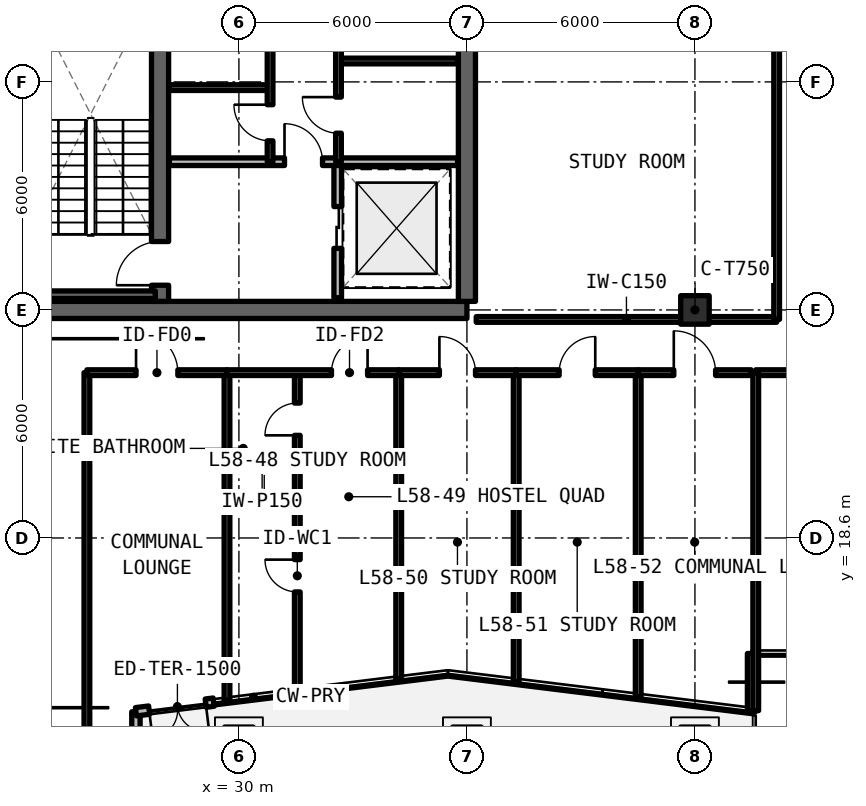
"""IFC4 building model, lengths in metres.
Left out: names, types, materials, properties, quantities, classifications, styles, units other than length and angle.
Written with IfcOpenShell. Run it as: python <this file> out.ifc"""

import sys

from ifc_helpers import new_model, si_unit, direction, frame, frame_2d, origin, origin_2d, place, context, subcontext, project, spatial, rectangle, extrude, element, fill, save


model = new_model("IFC4")
c1 = context("Model", 3, precision=1e-05, world=origin(), true_north=direction((0.0, 1.0)))
c2 = subcontext(c1, "Body", "Model", "MODEL_VIEW")
j1 = project(units=[si_unit("LENGTHUNIT", "METRE"), si_unit("PLANEANGLEUNIT", "RADIAN")], contexts=[c1])
p1 = place(None, origin())
s1 = spatial("IfcSite", under=j1, at=p1, CompositionType="ELEMENT")
p2 = place(p1, origin())
s2 = spatial("IfcBuilding", under=s1, at=p2, CompositionType="ELEMENT")
p3 = place(p2, frame((0.0, 0.0, 208.23)))
s3 = spatial("IfcBuildingStorey", under=s2, at=p3, CompositionType="ELEMENT", Elevation=208.23)
p4 = place(p3, frame((24.0, 24.6, 0.0), z_axis=(0.0, 0.0, 1.0), x_axis=(1.0, 0.0, 0.0)))
e1 = element("IfcWall", 1, at=p4, inside=s3, PredefinedType="SHEAR", context=c2, shape_type="SweptSolid", body=[
    extrude(rectangle(XDim=12.0, YDim=0.45, at=frame_2d((6.0, 0.0))), origin(), (0.0, 0.0, 1.0), 3.63),
])
p5 = place(p3, frame((36.0, 24.825, 0.0), z_axis=(0.0, 0.0, 1.0), x_axis=(0.0, 1.0, 0.0)))
e2 = element("IfcWall", 2, at=p5, inside=s3, PredefinedType="SHEAR", context=c2, shape_type="SweptSolid", body=[
    extrude(rectangle(XDim=8.975, YDim=0.45, at=frame_2d((4.488, 0.0))), origin(), (0.0, 0.0, 1.0), 3.63),
])
p6 = place(p3, frame((27.925, 24.825, 0.0), z_axis=(0.0, 0.0, 1.0), x_axis=(0.0, 1.0, 0.0)))
e3 = element("IfcWall", 3, at=p6, inside=s3, PredefinedType="SHEAR", context=c2, shape_type="SweptSolid", body=[
    extrude(rectangle(XDim=17.55, YDim=0.45, at=frame_2d((8.775, 0.0))), origin(), (0.0, 0.0, 1.0), 3.63),
])
p7 = place(p6, frame((0.425, 0.0, 0.0)))
e4 = element("IfcOpeningElement", 4, at=p7, cuts=e3, PredefinedType="OPENING", context=c2, shape_type="SweptSolid", body=[
    extrude(rectangle(XDim=1.15, YDim=2.15, at=frame_2d((0.575, 1.075))), frame((0.0, 0.235, 0.0), z_axis=(0.0, -1.0, 0.0), x_axis=(1.0, 0.0, 0.0)), (0.0, 0.0, 1.0), 0.47),
])
p8 = place(p6, frame((9.625, 0.0, 0.0)))
e5 = element("IfcOpeningElement", 5, at=p8, cuts=e3, PredefinedType="OPENING", context=c2, shape_type="SweptSolid", body=[
    extrude(rectangle(XDim=1.15, YDim=2.15, at=frame_2d((0.575, 1.075))), frame((0.0, 0.235, 0.0), z_axis=(0.0, -1.0, 0.0), x_axis=(1.0, 0.0, 0.0)), (0.0, 0.0, 1.0), 0.47),
])
p9 = place(p3, frame((42.0, 24.6, 0.0), z_axis=(0.0, 0.0, 1.0), x_axis=(1.0, 0.0, 0.0)))
e6 = element("IfcColumn", 6, at=p9, inside=s3, PredefinedType="COLUMN", context=c2, shape_type="SweptSolid", body=[
    extrude(rectangle(XDim=0.75, YDim=0.75, at=origin_2d()), origin(), (0.0, 0.0, 1.0), 3.63),
])
p10 = place(p3, frame((27.29, 12.16, 0.0), z_axis=(0.0, 0.0, 1.0), x_axis=(0.0, 1.0, 0.0)))
e7 = element("IfcWall", 7, at=p10, inside=s3, PredefinedType="SOLIDWALL", context=c2, shape_type="SweptSolid", body=[
    extrude(rectangle(XDim=1.867, YDim=0.22, at=frame_2d((0.934, 0.0))), origin(), (0.0, 0.0, 1.0), 3.41),
])
p11 = place(p3, frame((27.29, 14.027, 0.0), z_axis=(0.0, 0.0, 1.0), x_axis=(0.992462742039, 0.122546748898, 0.0)))
e8 = element("IfcWall", 8, at=p11, inside=s3, PredefinedType="SOLIDWALL", context=c2, shape_type="SweptSolid", body=[
    extrude(rectangle(XDim=2.06, YDim=0.22, at=frame_2d((1.03, 0.0))), origin(), (0.0, 0.0, 1.0), 3.41),
])
p12 = place(p11, frame((0.35, 0.0, 0.0)))
e9 = element("IfcOpeningElement", 9, at=p12, cuts=e8, PredefinedType="OPENING", context=c2, shape_type="SweptSolid", body=[
    extrude(rectangle(XDim=1.5, YDim=2.2, at=frame_2d((0.75, 1.1))), frame((0.0, 0.12, 0.0), z_axis=(0.0, -1.0, 0.0), x_axis=(1.0, 0.0, 0.0)), (0.0, 0.0, 1.0), 0.24),
])
p13 = place(p3, frame((43.49, 14.054, 0.0), z_axis=(0.0, 0.0, 1.0), x_axis=(0.0, 1.0, 0.0)))
e10 = element("IfcWall", 10, at=p13, inside=s3, PredefinedType="SOLIDWALL", context=c2, shape_type="SweptSolid", body=[
    extrude(rectangle(XDim=1.506, YDim=0.22, at=frame_2d((0.753, 0.0))), origin(), (0.0, 0.0, 1.0), 3.41),
])
p14 = place(p3, frame((21.71, 16.296, 0.0), z_axis=(0.0, 0.0, 1.0), x_axis=(0.707106781187, -0.707106781187, 0.0)))
e11 = element("IfcWall", 11, at=p14, inside=s3, PredefinedType="SOLIDWALL", context=c2, shape_type="SweptSolid", body=[
    extrude(rectangle(XDim=5.849, YDim=0.22, at=frame_2d((2.924, 0.0))), origin(), (0.0, 0.0, 1.0), 3.41),
])
p15 = place(p14, frame((1.224, 0.0, 0.78)))
e12 = element("IfcOpeningElement", 12, at=p15, cuts=e11, PredefinedType="OPENING", context=c2, shape_type="SweptSolid", body=[
    extrude(rectangle(XDim=3.4, YDim=1.66, at=frame_2d((1.7, 0.83))), frame((0.0, 0.12, 0.0), z_axis=(0.0, -1.0, 0.0), x_axis=(1.0, 0.0, 0.0)), (0.0, 0.0, 1.0), 0.24),
])
p16 = place(p3, frame((32.6, 24.92, 0.0), z_axis=(0.0, 0.0, 1.0), x_axis=(0.0, 1.0, 0.0)))
e13 = element("IfcWall", 13, at=p16, inside=s3, PredefinedType="SOLIDWALL", context=c2, shape_type="SweptSolid", body=[
    extrude(rectangle(XDim=3.58, YDim=0.2, at=frame_2d((1.79, 0.0))), origin(), (0.0, 0.0, 1.0), 2.63),
])
p17 = place(p16, frame((1.3, 0.0, 0.0)))
e14 = element("IfcOpeningElement", 14, at=p17, cuts=e13, PredefinedType="OPENING", context=c2, shape_type="SweptSolid", body=[
    extrude(rectangle(XDim=1.1, YDim=2.2, at=frame_2d((0.55, 1.1))), frame((0.0, 0.11, 0.0), z_axis=(0.0, -1.0, 0.0), x_axis=(1.0, 0.0, 0.0)), (0.0, 0.0, 1.0), 0.22),
])
p18 = place(p3, frame((28.17, 28.5, 0.0), z_axis=(0.0, 0.0, 1.0), x_axis=(1.0, 0.0, 0.0)))
e15 = element("IfcWall", 15, at=p18, inside=s3, PredefinedType="SOLIDWALL", context=c2, shape_type="SweptSolid", body=[
    extrude(rectangle(XDim=7.585, YDim=0.2, at=frame_2d((3.792, 0.0))), origin(), (0.0, 0.0, 1.0), 2.63),
])
p19 = place(p18, frame((3.03, 0.0, 0.0)))
e16 = element("IfcOpeningElement", 16, at=p19, cuts=e15, PredefinedType="OPENING", context=c2, shape_type="SweptSolid", body=[
    extrude(rectangle(XDim=1.0, YDim=2.15, at=frame_2d((0.5, 1.075))), frame((0.0, 0.11, 0.0), z_axis=(0.0, -1.0, 0.0), x_axis=(1.0, 0.0, 0.0)), (0.0, 0.0, 1.0), 0.22),
])
p20 = place(p3, frame((28.17, 30.45, 0.0), z_axis=(0.0, 0.0, 1.0), x_axis=(1.0, 0.0, 0.0)))
e17 = element("IfcWall", 17, at=p20, inside=s3, PredefinedType="SOLIDWALL", context=c2, shape_type="SweptSolid", body=[
    extrude(rectangle(XDim=2.63, YDim=0.15, at=frame_2d((1.315, 0.0))), origin(), (0.0, 0.0, 1.0), 2.63),
])
p21 = place(p3, frame((30.82, 28.5, 0.0), z_axis=(0.0, 0.0, 1.0), x_axis=(0.0, 1.0, 0.0)))
e18 = element("IfcWall", 18, at=p21, inside=s3, PredefinedType="SOLIDWALL", context=c2, shape_type="SweptSolid", body=[
    extrude(rectangle(XDim=5.22, YDim=0.15, at=frame_2d((2.61, 0.0))), origin(), (0.0, 0.0, 1.0), 2.63),
])
p22 = place(p21, frame((0.55, 0.0, 0.0)))
e19 = element("IfcOpeningElement", 19, at=p22, cuts=e18, PredefinedType="OPENING", context=c2, shape_type="SweptSolid", body=[
    extrude(rectangle(XDim=0.95, YDim=2.15, at=frame_2d((0.475, 1.075))), frame((0.0, 0.085, 0.0), z_axis=(0.0, -1.0, 0.0), x_axis=(1.0, 0.0, 0.0)), (0.0, 0.0, 1.0), 0.17),
])
p23 = place(p21, frame((3.35, 0.0, 0.0)))
e20 = element("IfcOpeningElement", 20, at=p23, cuts=e18, PredefinedType="OPENING", context=c2, shape_type="SweptSolid", body=[
    extrude(rectangle(XDim=0.95, YDim=2.15, at=frame_2d((0.475, 1.075))), frame((0.0, 0.085, 0.0), z_axis=(0.0, -1.0, 0.0), x_axis=(1.0, 0.0, 0.0)), (0.0, 0.0, 1.0), 0.17),
])
p24 = place(p3, frame((32.68, 31.15, 0.0), z_axis=(0.0, 0.0, 1.0), x_axis=(1.0, 0.0, 0.0)))
e21 = element("IfcWall", 21, at=p24, inside=s3, PredefinedType="SOLIDWALL", context=c2, shape_type="SweptSolid", body=[
    extrude(rectangle(XDim=3.075, YDim=0.15, at=frame_2d((1.538, 0.0))), origin(), (0.0, 0.0, 1.0), 2.63),
])
p25 = place(p3, frame((32.62, 28.5, 0.0), z_axis=(0.0, 0.0, 1.0), x_axis=(0.0, 1.0, 0.0)))
e22 = element("IfcWall", 22, at=p25, inside=s3, PredefinedType="SOLIDWALL", context=c2, shape_type="SweptSolid", body=[
    extrude(rectangle(XDim=5.22, YDim=0.15, at=frame_2d((2.61, 0.0))), origin(), (0.0, 0.0, 1.0), 2.63),
])
p26 = place(p25, frame((0.75, 0.0, 0.0)))
e23 = element("IfcOpeningElement", 23, at=p26, cuts=e22, PredefinedType="OPENING", context=c2, shape_type="SweptSolid", body=[
    extrude(rectangle(XDim=0.95, YDim=2.15, at=frame_2d((0.475, 1.075))), frame((0.0, 0.085, 0.0), z_axis=(0.0, -1.0, 0.0), x_axis=(1.0, 0.0, 0.0)), (0.0, 0.0, 1.0), 0.17),
])
p27 = place(p25, frame((3.35, 0.0, 0.0)))
e24 = element("IfcOpeningElement", 24, at=p27, cuts=e22, PredefinedType="OPENING", context=c2, shape_type="SweptSolid", body=[
    extrude(rectangle(XDim=0.95, YDim=2.15, at=frame_2d((0.475, 1.075))), frame((0.0, 0.085, 0.0), z_axis=(0.0, -1.0, 0.0), x_axis=(1.0, 0.0, 0.0)), (0.0, 0.0, 1.0), 0.17),
])
p28 = place(p3, frame((36.245, 24.35, 0.0), z_axis=(0.0, 0.0, 1.0), x_axis=(1.0, 0.0, 0.0)))
e25 = element("IfcWall", 25, at=p28, inside=s3, PredefinedType="SOLIDWALL", context=c2, shape_type="SweptSolid", body=[
    extrude(rectangle(XDim=7.905, YDim=0.15, at=frame_2d((3.952, 0.0))), origin(), (0.0, 0.0, 1.0), 2.63),
])
p29 = place(p3, frame((44.15, 24.35, 0.0), z_axis=(0.0, 0.0, 1.0), x_axis=(0.0, 1.0, 0.0)))
e26 = element("IfcWall", 26, at=p29, inside=s3, PredefinedType="SOLIDWALL", context=c2, shape_type="SweptSolid", body=[
    extrude(rectangle(XDim=9.4, YDim=0.15, at=frame_2d((4.7, 0.0))), origin(), (0.0, 0.0, 1.0), 2.63),
])
p30 = place(p3, frame((43.6, 22.95, 0.0), z_axis=(0.0, 0.0, 1.0), x_axis=(1.0, 0.0, 0.0)))
e27 = element("IfcWall", 27, at=p30, inside=s3, PredefinedType="SOLIDWALL", context=c2, shape_type="SweptSolid", body=[
    extrude(rectangle(XDim=8.4, YDim=0.15, at=frame_2d((4.2, 0.0))), origin(), (0.0, 0.0, 1.0), 2.63),
])
p31 = place(p30, frame((2.3, 0.0, 0.0)))
e28 = element("IfcOpeningElement", 28, at=p31, cuts=e27, PredefinedType="OPENING", context=c2, shape_type="SweptSolid", body=[
    extrude(rectangle(XDim=1.1, YDim=2.15, at=frame_2d((0.55, 1.075))), frame((0.0, 0.085, 0.0), z_axis=(0.0, -1.0, 0.0), x_axis=(1.0, 0.0, 0.0)), (0.0, 0.0, 1.0), 0.17),
])
p32 = place(p3, frame((43.6, 14.056, 0.0), z_axis=(0.0, 0.0, 1.0), x_axis=(0.0, 1.0, 0.0)))
e29 = element("IfcWall", 29, at=p32, inside=s3, PredefinedType="SOLIDWALL", context=c2, shape_type="SweptSolid", body=[
    extrude(rectangle(XDim=8.894, YDim=0.15, at=frame_2d((4.447, 0.0))), origin(), (0.0, 0.0, 1.0), 2.63),
])
p33 = place(p3, frame((26.0, 12.16, 0.0), z_axis=(0.0, 0.0, 1.0), x_axis=(0.0, 1.0, 0.0)))
e30 = element("IfcWall", 30, at=p33, inside=s3, PredefinedType="SOLIDWALL", context=c2, shape_type="SweptSolid", body=[
    extrude(rectangle(XDim=10.79, YDim=0.15, at=frame_2d((5.395, 0.0))), origin(), (0.0, 0.0, 1.0), 2.63),
])
p34 = place(p3, frame((29.686, 14.323, 0.0), z_axis=(0.0, 0.0, 1.0), x_axis=(0.0, 1.0, 0.0)))
e31 = element("IfcWall", 31, at=p34, inside=s3, PredefinedType="SOLIDWALL", context=c2, shape_type="SweptSolid", body=[
    extrude(rectangle(XDim=8.627, YDim=0.15, at=frame_2d((4.313, 0.0))), origin(), (0.0, 0.0, 1.0), 2.63),
])
p35 = place(p3, frame((26.0, 22.95, 0.0), z_axis=(0.0, 0.0, 1.0), x_axis=(1.0, 0.0, 0.0)))
e32 = element("IfcWall", 32, at=p35, inside=s3, PredefinedType="SOLIDWALL", context=c2, shape_type="SweptSolid", body=[
    extrude(rectangle(XDim=3.686, YDim=0.15, at=frame_2d((1.843, 0.0))), origin(), (0.0, 0.0, 1.0), 2.63),
])
p36 = place(p35, frame((1.293, 0.0, 0.0)))
e33 = element("IfcOpeningElement", 33, at=p36, cuts=e32, PredefinedType="OPENING", context=c2, shape_type="SweptSolid", body=[
    extrude(rectangle(XDim=1.1, YDim=2.15, at=frame_2d((0.55, 1.075))), frame((0.0, 0.085, 0.0), z_axis=(0.0, -1.0, 0.0), x_axis=(1.0, 0.0, 0.0)), (0.0, 0.0, 1.0), 0.17),
])
p37 = place(p3, frame((34.205, 14.881, 0.0), z_axis=(0.0, 0.0, 1.0), x_axis=(0.0, 1.0, 0.0)))
e34 = element("IfcWall", 34, at=p37, inside=s3, PredefinedType="SOLIDWALL", context=c2, shape_type="SweptSolid", body=[
    extrude(rectangle(XDim=8.069, YDim=0.15, at=frame_2d((4.035, 0.0))), origin(), (0.0, 0.0, 1.0), 2.63),
])
p38 = place(p3, frame((29.686, 20.5, 0.0), z_axis=(0.0, 0.0, 1.0), x_axis=(1.0, 0.0, 0.0)))
e35 = element("IfcWall", 35, at=p38, inside=s3, PredefinedType="PARTITIONING", context=c2, shape_type="SweptSolid", body=[
    extrude(rectangle(XDim=1.85, YDim=0.15, at=frame_2d((0.925, 0.0))), origin(), (0.0, 0.0, 1.0), 2.63),
])
p39 = place(p3, frame((31.536, 14.552, 0.0), z_axis=(0.0, 0.0, 1.0), x_axis=(0.0, 1.0, 0.0)))
e36 = element("IfcWall", 36, at=p39, inside=s3, PredefinedType="PARTITIONING", context=c2, shape_type="SweptSolid", body=[
    extrude(rectangle(XDim=8.398, YDim=0.15, at=frame_2d((4.199, 0.0))), origin(), (0.0, 0.0, 1.0), 2.63),
])
p40 = place(p39, frame((2.628, 0.0, 0.0)))
e37 = element("IfcOpeningElement", 37, at=p40, cuts=e36, PredefinedType="OPENING", context=c2, shape_type="SweptSolid", body=[
    extrude(rectangle(XDim=0.85, YDim=2.1, at=frame_2d((0.425, 1.05))), frame((0.0, 0.085, 0.0), z_axis=(0.0, -1.0, 0.0), x_axis=(1.0, 0.0, 0.0)), (0.0, 0.0, 1.0), 0.17),
])
p41 = place(p39, frame((6.749, 0.0, 0.0)))
e38 = element("IfcOpeningElement", 38, at=p41, cuts=e36, PredefinedType="OPENING", context=c2, shape_type="SweptSolid", body=[
    extrude(rectangle(XDim=0.85, YDim=2.1, at=frame_2d((0.425, 1.05))), frame((0.0, 0.085, 0.0), z_axis=(0.0, -1.0, 0.0), x_axis=(1.0, 0.0, 0.0)), (0.0, 0.0, 1.0), 0.17),
])
p42 = place(p3, frame((29.686, 22.95, 0.0), z_axis=(0.0, 0.0, 1.0), x_axis=(1.0, 0.0, 0.0)))
e39 = element("IfcWall", 39, at=p42, inside=s3, PredefinedType="SOLIDWALL", context=c2, shape_type="SweptSolid", body=[
    extrude(rectangle(XDim=4.519, YDim=0.15, at=frame_2d((2.259, 0.0))), origin(), (0.0, 0.0, 1.0), 2.63),
])
p43 = place(p42, frame((2.749, 0.0, 0.0)))
e40 = element("IfcOpeningElement", 40, at=p43, cuts=e39, PredefinedType="OPENING", context=c2, shape_type="SweptSolid", body=[
    extrude(rectangle(XDim=0.95, YDim=2.15, at=frame_2d((0.475, 1.075))), frame((0.0, 0.085, 0.0), z_axis=(0.0, -1.0, 0.0), x_axis=(1.0, 0.0, 0.0)), (0.0, 0.0, 1.0), 0.17),
])
p44 = place(p3, frame((37.297, 14.819, 0.0), z_axis=(0.0, 0.0, 1.0), x_axis=(0.0, 1.0, 0.0)))
e41 = element("IfcWall", 41, at=p44, inside=s3, PredefinedType="SOLIDWALL", context=c2, shape_type="SweptSolid", body=[
    extrude(rectangle(XDim=8.131, YDim=0.15, at=frame_2d((4.065, 0.0))), origin(), (0.0, 0.0, 1.0), 2.63),
])
p45 = place(p3, frame((34.205, 22.95, 0.0), z_axis=(0.0, 0.0, 1.0), x_axis=(1.0, 0.0, 0.0)))
e42 = element("IfcWall", 42, at=p45, inside=s3, PredefinedType="SOLIDWALL", context=c2, shape_type="SweptSolid", body=[
    extrude(rectangle(XDim=3.092, YDim=0.15, at=frame_2d((1.546, 0.0))), origin(), (0.0, 0.0, 1.0), 2.63),
])
p46 = place(p45, frame((1.071, 0.0, 0.0)))
e43 = element("IfcOpeningElement", 43, at=p46, cuts=e42, PredefinedType="OPENING", context=c2, shape_type="SweptSolid", body=[
    extrude(rectangle(XDim=0.95, YDim=2.15, at=frame_2d((0.475, 1.075))), frame((0.0, 0.085, 0.0), z_axis=(0.0, -1.0, 0.0), x_axis=(1.0, 0.0, 0.0)), (0.0, 0.0, 1.0), 0.17),
])
p47 = place(p3, frame((40.507, 14.423, 0.0), z_axis=(0.0, 0.0, 1.0), x_axis=(0.0, 1.0, 0.0)))
e44 = element("IfcWall", 44, at=p47, inside=s3, PredefinedType="SOLIDWALL", context=c2, shape_type="SweptSolid", body=[
    extrude(rectangle(XDim=8.527, YDim=0.15, at=frame_2d((4.264, 0.0))), origin(), (0.0, 0.0, 1.0), 2.63),
])
p48 = place(p3, frame((37.297, 22.95, 0.0), z_axis=(0.0, 0.0, 1.0), x_axis=(1.0, 0.0, 0.0)))
e45 = element("IfcWall", 45, at=p48, inside=s3, PredefinedType="SOLIDWALL", context=c2, shape_type="SweptSolid", body=[
    extrude(rectangle(XDim=3.21, YDim=0.15, at=frame_2d((1.605, 0.0))), origin(), (0.0, 0.0, 1.0), 2.63),
])
p49 = place(p48, frame((1.13, 0.0, 0.0)))
e46 = element("IfcOpeningElement", 46, at=p49, cuts=e45, PredefinedType="OPENING", context=c2, shape_type="SweptSolid", body=[
    extrude(rectangle(XDim=0.95, YDim=2.15, at=frame_2d((0.475, 1.075))), frame((0.0, 0.085, 0.0), z_axis=(0.0, -1.0, 0.0), x_axis=(1.0, 0.0, 0.0)), (0.0, 0.0, 1.0), 0.17),
])
p50 = place(p3, frame((40.507, 22.95, 0.0), z_axis=(0.0, 0.0, 1.0), x_axis=(1.0, 0.0, 0.0)))
e47 = element("IfcWall", 47, at=p50, inside=s3, PredefinedType="SOLIDWALL", context=c2, shape_type="SweptSolid", body=[
    extrude(rectangle(XDim=2.973, YDim=0.15, at=frame_2d((1.486, 0.0))), origin(), (0.0, 0.0, 1.0), 2.63),
])
p51 = place(p50, frame((0.936, 0.0, 0.0)))
e48 = element("IfcOpeningElement", 48, at=p51, cuts=e47, PredefinedType="OPENING", context=c2, shape_type="SweptSolid", body=[
    extrude(rectangle(XDim=1.1, YDim=2.15, at=frame_2d((0.55, 1.075))), frame((0.0, 0.085, 0.0), z_axis=(0.0, -1.0, 0.0), x_axis=(1.0, 0.0, 0.0)), (0.0, 0.0, 1.0), 0.17),
])
p52 = place(p3, frame((24.4, 25.0, 0.0), z_axis=(0.0, 0.0, 1.0), x_axis=(1.0, 0.0, 0.0)))
e49 = element("IfcWall", 49, at=p52, inside=s3, PredefinedType="SOLIDWALL", context=c2, shape_type="SweptSolid", body=[
    extrude(rectangle(XDim=3.4, YDim=0.2, at=frame_2d((1.7, 0.0))), origin(), (0.0, 0.0, 1.0), 3.63),
])
p53 = place(p12, frame((1.5, 0.0, 0.0), z_axis=(0.0, 0.0, 1.0), x_axis=(-1.0, 0.0, 0.0)))
e50 = element("IfcDoor", 50, at=p53, inside=s3, OperationType="SINGLE_SWING_LEFT", PredefinedType="DOOR", context=c2, shape_type="SweptSolid", body=[
    extrude(rectangle(XDim=1.5, YDim=2.2, at=frame_2d((0.75, 1.1))), frame((0.0, 0.025, 0.0), z_axis=(0.0, -1.0, 0.0), x_axis=(1.0, 0.0, 0.0)), (0.0, 0.0, 1.0), 0.05),
])
fill(e9, e50)
p54 = place(p17, origin())
e51 = element("IfcDoor", 51, at=p54, inside=s3, OperationType="SLIDING_TO_LEFT", PredefinedType="DOOR", context=c2, shape_type="SweptSolid", body=[
    extrude(rectangle(XDim=1.1, YDim=2.2, at=frame_2d((0.55, 1.1))), frame((0.0, 0.025, 0.0), z_axis=(0.0, -1.0, 0.0), x_axis=(1.0, 0.0, 0.0)), (0.0, 0.0, 1.0), 0.05),
])
fill(e14, e51)
p55 = place(p19, origin())
e52 = element("IfcDoor", 52, at=p55, inside=s3, OperationType="SINGLE_SWING_LEFT", PredefinedType="DOOR", context=c2, shape_type="SweptSolid", body=[
    extrude(rectangle(XDim=1.0, YDim=2.15, at=frame_2d((0.5, 1.075))), frame((0.0, 0.025, 0.0), z_axis=(0.0, -1.0, 0.0), x_axis=(1.0, 0.0, 0.0)), (0.0, 0.0, 1.0), 0.05),
])
fill(e16, e52)
p56 = place(p22, origin())
e53 = element("IfcDoor", 53, at=p56, inside=s3, OperationType="SINGLE_SWING_RIGHT", PredefinedType="DOOR", context=c2, shape_type="SweptSolid", body=[
    extrude(rectangle(XDim=0.95, YDim=2.15, at=frame_2d((0.475, 1.075))), frame((0.0, 0.025, 0.0), z_axis=(0.0, -1.0, 0.0), x_axis=(1.0, 0.0, 0.0)), (0.0, 0.0, 1.0), 0.05),
])
fill(e19, e53)
p57 = place(p26, origin())
e54 = element("IfcDoor", 54, at=p57, inside=s3, OperationType="SINGLE_SWING_RIGHT", PredefinedType="DOOR", context=c2, shape_type="SweptSolid", body=[
    extrude(rectangle(XDim=0.95, YDim=2.15, at=frame_2d((0.475, 1.075))), frame((0.0, 0.025, 0.0), z_axis=(0.0, -1.0, 0.0), x_axis=(1.0, 0.0, 0.0)), (0.0, 0.0, 1.0), 0.05),
])
fill(e23, e54)
p58 = place(p36, origin())
e55 = element("IfcDoor", 55, at=p58, inside=s3, OperationType="SINGLE_SWING_LEFT", PredefinedType="DOOR", context=c2, shape_type="SweptSolid", body=[
    extrude(rectangle(XDim=1.1, YDim=2.15, at=frame_2d((0.55, 1.075))), frame((0.0, 0.025, 0.0), z_axis=(0.0, -1.0, 0.0), x_axis=(1.0, 0.0, 0.0)), (0.0, 0.0, 1.0), 0.05),
])
fill(e33, e55)
p59 = place(p40, origin())
e56 = element("IfcDoor", 56, at=p59, inside=s3, OperationType="SINGLE_SWING_RIGHT", PredefinedType="DOOR", context=c2, shape_type="SweptSolid", body=[
    extrude(rectangle(XDim=0.85, YDim=2.1, at=frame_2d((0.425, 1.05))), frame((0.0, 0.025, 0.0), z_axis=(0.0, -1.0, 0.0), x_axis=(1.0, 0.0, 0.0)), (0.0, 0.0, 1.0), 0.05),
])
fill(e37, e56)
p60 = place(p41, origin())
e57 = element("IfcDoor", 57, at=p60, inside=s3, OperationType="SINGLE_SWING_LEFT", PredefinedType="DOOR", context=c2, shape_type="SweptSolid", body=[
    extrude(rectangle(XDim=0.85, YDim=2.1, at=frame_2d((0.425, 1.05))), frame((0.0, 0.025, 0.0), z_axis=(0.0, -1.0, 0.0), x_axis=(1.0, 0.0, 0.0)), (0.0, 0.0, 1.0), 0.05),
])
fill(e38, e57)
p61 = place(p43, origin())
e58 = element("IfcDoor", 58, at=p61, inside=s3, OperationType="SINGLE_SWING_RIGHT", PredefinedType="DOOR", context=c2, shape_type="SweptSolid", body=[
    extrude(rectangle(XDim=0.95, YDim=2.15, at=frame_2d((0.475, 1.075))), frame((0.0, 0.025, 0.0), z_axis=(0.0, -1.0, 0.0), x_axis=(1.0, 0.0, 0.0)), (0.0, 0.0, 1.0), 0.05),
])
fill(e40, e58)
p62 = place(p46, origin())
e59 = element("IfcDoor", 59, at=p62, inside=s3, OperationType="SINGLE_SWING_LEFT", PredefinedType="DOOR", context=c2, shape_type="SweptSolid", body=[
    extrude(rectangle(XDim=0.95, YDim=2.15, at=frame_2d((0.475, 1.075))), frame((0.0, 0.025, 0.0), z_axis=(0.0, -1.0, 0.0), x_axis=(1.0, 0.0, 0.0)), (0.0, 0.0, 1.0), 0.05),
])
fill(e43, e59)
p63 = place(p49, origin())
e60 = element("IfcDoor", 60, at=p63, inside=s3, OperationType="SINGLE_SWING_RIGHT", PredefinedType="DOOR", context=c2, shape_type="SweptSolid", body=[
    extrude(rectangle(XDim=0.95, YDim=2.15, at=frame_2d((0.475, 1.075))), frame((0.0, 0.025, 0.0), z_axis=(0.0, -1.0, 0.0), x_axis=(1.0, 0.0, 0.0)), (0.0, 0.0, 1.0), 0.05),
])
fill(e46, e60)
p64 = place(p51, origin())
e61 = element("IfcDoor", 61, at=p64, inside=s3, OperationType="SINGLE_SWING_LEFT", PredefinedType="DOOR", context=c2, shape_type="SweptSolid", body=[
    extrude(rectangle(XDim=1.1, YDim=2.15, at=frame_2d((0.55, 1.075))), frame((0.0, 0.025, 0.0), z_axis=(0.0, -1.0, 0.0), x_axis=(1.0, 0.0, 0.0)), (0.0, 0.0, 1.0), 0.05),
])
fill(e48, e61)
p65 = place(p7, origin())
e62 = element("IfcDoor", 62, at=p65, inside=s3, OperationType="SINGLE_SWING_LEFT", PredefinedType="DOOR", context=c2, shape_type="SweptSolid", body=[
    extrude(rectangle(XDim=1.15, YDim=2.15, at=frame_2d((0.575, 1.075))), frame((0.0, 0.025, 0.0), z_axis=(0.0, -1.0, 0.0), x_axis=(1.0, 0.0, 0.0)), (0.0, 0.0, 1.0), 0.05),
])
fill(e4, e62)
save(model, sys.argv[1])
